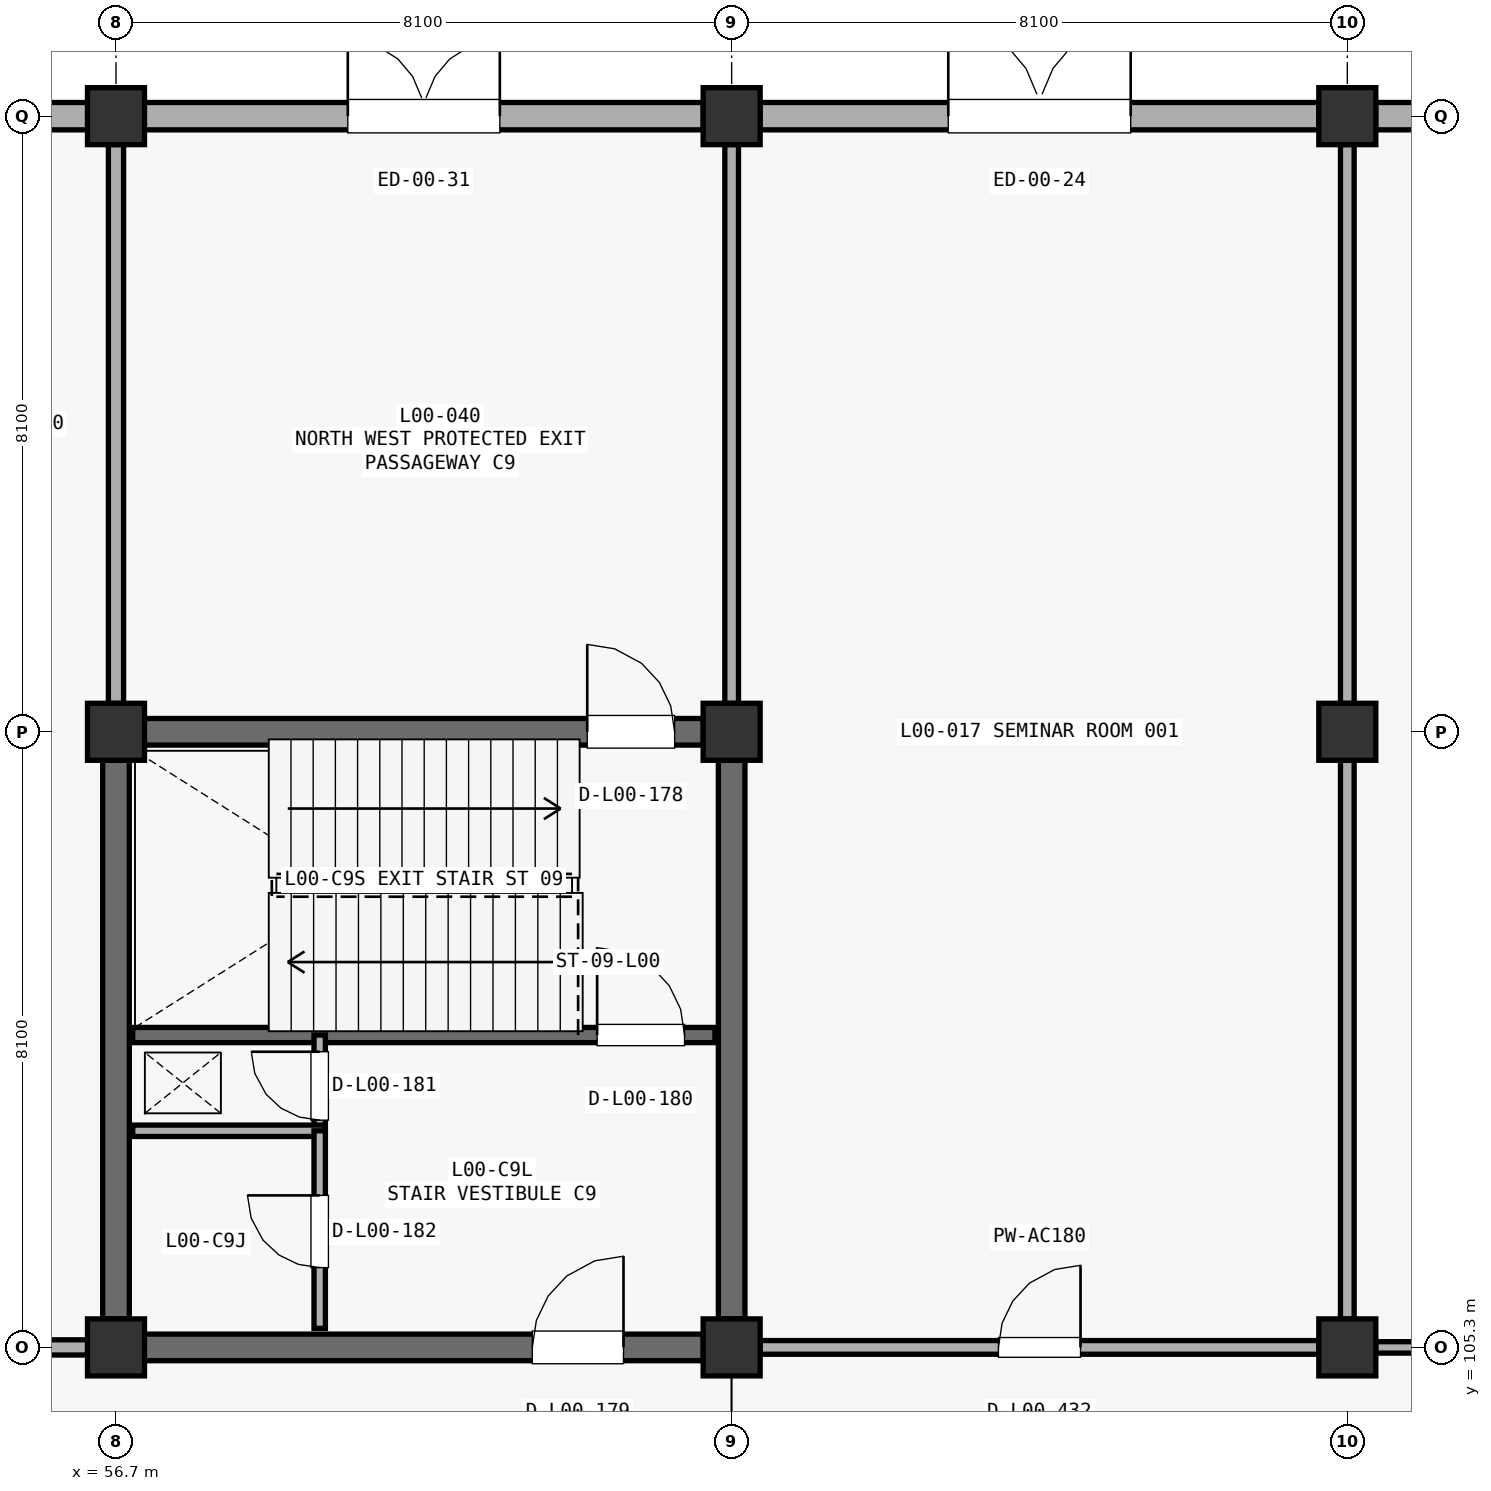
"""IFC4 building model, lengths in metres.
Left out: names, types, materials, properties, quantities, classifications, styles, units other than length and angle.
Written with IfcOpenShell. Run it as: python <this file> out.ifc"""

import sys

from ifc_helpers import new_model, si_unit, direction, frame, frame_2d, origin, origin_2d, place, context, subcontext, project, spatial, rectangle, extrude, element, fill, save


model = new_model("IFC4")
c1 = context("Model", 3, precision=1e-05, world=origin(), true_north=direction((0.0, 1.0)))
c2 = subcontext(c1, "Body", "Model", "MODEL_VIEW")
j1 = project(units=[si_unit("LENGTHUNIT", "METRE"), si_unit("PLANEANGLEUNIT", "RADIAN")], contexts=[c1])
p1 = place(None, origin())
s1 = spatial("IfcSite", under=j1, at=p1, CompositionType="ELEMENT")
p2 = place(p1, origin())
s2 = spatial("IfcBuilding", under=s1, at=p2, CompositionType="ELEMENT")
p3 = place(p2, origin())
s3 = spatial("IfcBuildingStorey", under=s2, at=p3, CompositionType="ELEMENT", Elevation=0.0)
for number, where, z_axis, x_axis in (
    (1, (56.7, 105.3, 0.0), (0.0, 0.0, 1.0), (1.0, 0.0, 0.0)),
    (2, (56.7, 113.4, 0.0), (0.0, 0.0, 1.0), (1.0, 0.0, 0.0)),
    (3, (56.7, 121.5, 0.0), (0.0, 0.0, 1.0), (1.0, 0.0, 0.0)),
    (4, (64.8, 105.3, 0.0), (0.0, 0.0, 1.0), (1.0, 0.0, 0.0)),
    (5, (64.8, 113.4, 0.0), (0.0, 0.0, 1.0), (1.0, 0.0, 0.0)),
    (6, (64.8, 121.5, 0.0), (0.0, 0.0, 1.0), (1.0, 0.0, 0.0)),
    (7, (72.9, 105.3, 0.0), (0.0, 0.0, 1.0), (1.0, 0.0, 0.0)),
    (8, (72.9, 113.4, 0.0), (0.0, 0.0, 1.0), (1.0, 0.0, 0.0)),
    (9, (72.9, 121.5, 0.0), (0.0, 0.0, 1.0), (1.0, 0.0, 0.0)),
):
    element("IfcColumn", number, at=place(p3, frame(where, z_axis=z_axis, x_axis=x_axis)), inside=s3, PredefinedType="COLUMN", context=c2, shape_type="SweptSolid", body=[
        extrude(rectangle(XDim=0.75, YDim=0.75, at=origin_2d()), origin(), (0.0, 0.0, 1.0), 5.1),
    ])
p4 = place(p3, frame((48.973, 121.5, 0.0), z_axis=(0.0, 0.0, 1.0), x_axis=(1.0, 0.0, 0.0)))
e10 = element("IfcWall", 10, at=p4, inside=s3, PredefinedType="STANDARD", context=c2, shape_type="SweptSolid", body=[
    extrude(rectangle(XDim=7.354, YDim=0.36, at=frame_2d((3.677, 0.0))), origin(), (0.0, 0.0, 1.0), 4.407),
])
p5 = place(p4, frame((2.477, 0.0, 0.0)))
e11 = element("IfcOpeningElement", 11, at=p5, cuts=e10, PredefinedType="OPENING", context=c2, shape_type="SweptSolid", body=[
    extrude(rectangle(XDim=2.4, YDim=2.4, at=frame_2d((1.2, 1.2))), frame((0.0, 0.19, 0.0), z_axis=(0.0, -1.0, 0.0), x_axis=(1.0, 0.0, 0.0)), (0.0, 0.0, 1.0), 0.38),
])
p6 = place(p3, frame((57.073, 121.5, 0.0), z_axis=(0.0, 0.0, 1.0), x_axis=(1.0, 0.0, 0.0)))
e12 = element("IfcWall", 12, at=p6, inside=s3, PredefinedType="STANDARD", context=c2, shape_type="SweptSolid", body=[
    extrude(rectangle(XDim=7.354, YDim=0.36, at=frame_2d((3.677, 0.0))), origin(), (0.0, 0.0, 1.0), 3.972),
])
p7 = place(p6, frame((2.677, 0.0, 0.0)))
e13 = element("IfcOpeningElement", 13, at=p7, cuts=e12, PredefinedType="OPENING", context=c2, shape_type="SweptSolid", body=[
    extrude(rectangle(XDim=2.0, YDim=2.2, at=frame_2d((1.0, 1.1))), frame((0.0, 0.19, 0.0), z_axis=(0.0, -1.0, 0.0), x_axis=(1.0, 0.0, 0.0)), (0.0, 0.0, 1.0), 0.38),
])
p8 = place(p3, frame((65.173, 121.5, 0.0), z_axis=(0.0, 0.0, 1.0), x_axis=(1.0, 0.0, 0.0)))
e14 = element("IfcWall", 14, at=p8, inside=s3, PredefinedType="STANDARD", context=c2, shape_type="SweptSolid", body=[
    extrude(rectangle(XDim=7.354, YDim=0.36, at=frame_2d((3.677, 0.0))), origin(), (0.0, 0.0, 1.0), 3.872),
])
p9 = place(p8, frame((2.477, 0.0, 0.0)))
e15 = element("IfcOpeningElement", 15, at=p9, cuts=e14, PredefinedType="OPENING", context=c2, shape_type="SweptSolid", body=[
    extrude(rectangle(XDim=2.4, YDim=2.4, at=frame_2d((1.2, 1.2))), frame((0.0, 0.19, 0.0), z_axis=(0.0, -1.0, 0.0), x_axis=(1.0, 0.0, 0.0)), (0.0, 0.0, 1.0), 0.38),
])
p10 = place(p3, frame((73.273, 121.5, 0.0), z_axis=(0.0, 0.0, 1.0), x_axis=(1.0, 0.0, 0.0)))
e16 = element("IfcWall", 16, at=p10, inside=s3, PredefinedType="STANDARD", context=c2, shape_type="SweptSolid", body=[
    extrude(rectangle(XDim=7.354, YDim=0.36, at=frame_2d((3.677, 0.0))), origin(), (0.0, 0.0, 1.0), 4.407),
])
p11 = place(p10, frame((3.227, 0.0, 0.85)))
e17 = element("IfcOpeningElement", 17, at=p11, cuts=e16, PredefinedType="OPENING", context=c2, shape_type="SweptSolid", body=[
    extrude(rectangle(XDim=0.9, YDim=1.9, at=frame_2d((0.45, 0.95))), frame((0.0, 0.19, 0.0), z_axis=(0.0, -1.0, 0.0), x_axis=(1.0, 0.0, 0.0)), (0.0, 0.0, 1.0), 0.38),
])
p12 = place(p3, frame((57.073, 113.4, 0.0), z_axis=(0.0, 0.0, 1.0), x_axis=(1.0, 0.0, 0.0)))
e18 = element("IfcWall", 18, at=p12, inside=s3, PredefinedType="SHEAR", context=c2, shape_type="SweptSolid", body=[
    extrude(rectangle(XDim=7.354, YDim=0.35, at=frame_2d((3.677, 0.0))), origin(), (0.0, 0.0, 1.0), 4.822),
])
p13 = place(p12, frame((5.827, 0.0, 0.0)))
e19 = element("IfcOpeningElement", 19, at=p13, cuts=e18, PredefinedType="OPENING", context=c2, shape_type="SweptSolid", body=[
    extrude(rectangle(XDim=1.15, YDim=2.2, at=frame_2d((0.575, 1.1))), frame((0.0, 0.185, 0.0), z_axis=(0.0, -1.0, 0.0), x_axis=(1.0, 0.0, 0.0)), (0.0, 0.0, 1.0), 0.37),
])
for number, where, z_axis, x_axis in (
    (20, (56.7, 105.673, 0.0), (0.0, 0.0, 1.0), (0.0, 1.0, 0.0)),
    (21, (64.8, 105.673, 0.0), (0.0, 0.0, 1.0), (0.0, 1.0, 0.0)),
):
    element("IfcWall", number, at=place(p3, frame(where, z_axis=z_axis, x_axis=x_axis)), inside=s3, PredefinedType="SHEAR", context=c2, shape_type="SweptSolid", body=[
        extrude(rectangle(XDim=7.354, YDim=0.35, at=frame_2d((3.677, 0.0))), origin(), (0.0, 0.0, 1.0), 4.822),
    ])
p14 = place(p3, frame((57.073, 105.3, 0.0), z_axis=(0.0, 0.0, 1.0), x_axis=(1.0, 0.0, 0.0)))
e22 = element("IfcWall", 22, at=p14, inside=s3, PredefinedType="SHEAR", context=c2, shape_type="SweptSolid", body=[
    extrude(rectangle(XDim=7.354, YDim=0.35, at=frame_2d((3.677, 0.0))), origin(), (0.0, 0.0, 1.0), 4.822),
])
p15 = place(p14, frame((5.104, 0.0, 0.0)))
e23 = element("IfcOpeningElement", 23, at=p15, cuts=e22, PredefinedType="OPENING", context=c2, shape_type="SweptSolid", body=[
    extrude(rectangle(XDim=1.2, YDim=2.2, at=frame_2d((0.6, 1.1))), frame((0.0, 0.185, 0.0), z_axis=(0.0, -1.0, 0.0), x_axis=(1.0, 0.0, 0.0)), (0.0, 0.0, 1.0), 0.37),
])
p16 = place(p3, frame((56.92, 109.41, 0.0), z_axis=(0.0, 0.0, 1.0), x_axis=(1.0, 0.0, 0.0)))
e24 = element("IfcWall", 24, at=p16, inside=s3, PredefinedType="SHEAR", context=c2, shape_type="SweptSolid", body=[
    extrude(rectangle(XDim=7.66, YDim=0.2, at=frame_2d((3.83, 0.0))), origin(), (0.0, 0.0, 1.0), 4.822),
])
p17 = place(p16, frame((6.11, 0.0, 0.0)))
e25 = element("IfcOpeningElement", 25, at=p17, cuts=e24, PredefinedType="OPENING", context=c2, shape_type="SweptSolid", body=[
    extrude(rectangle(XDim=1.15, YDim=2.2, at=frame_2d((0.575, 1.1))), frame((0.0, 0.11, 0.0), z_axis=(0.0, -1.0, 0.0), x_axis=(1.0, 0.0, 0.0)), (0.0, 0.0, 1.0), 0.22),
])
p18 = place(p3, frame((59.38, 108.15, 0.0), z_axis=(0.0, 0.0, 1.0), x_axis=(0.0, 1.0, 0.0)))
e26 = element("IfcWall", 26, at=p18, inside=s3, PredefinedType="PARTITIONING", context=c2, shape_type="SweptSolid", body=[
    extrude(rectangle(XDim=1.26, YDim=0.15, at=frame_2d((0.63, 0.0))), origin(), (0.0, 0.0, 1.0), 4.822),
])
p19 = place(p18, frame((0.14, 0.0, 0.0)))
e27 = element("IfcOpeningElement", 27, at=p19, cuts=e26, PredefinedType="OPENING", context=c2, shape_type="SweptSolid", body=[
    extrude(rectangle(XDim=0.9, YDim=2.15, at=frame_2d((0.45, 1.075))), frame((0.0, 0.085, 0.0), z_axis=(0.0, -1.0, 0.0), x_axis=(1.0, 0.0, 0.0)), (0.0, 0.0, 1.0), 0.17),
])
p20 = place(p3, frame((56.92, 108.15, 0.0), z_axis=(0.0, 0.0, 1.0), x_axis=(1.0, 0.0, 0.0)))
e28 = element("IfcWall", 28, at=p20, inside=s3, PredefinedType="PARTITIONING", context=c2, shape_type="SweptSolid", body=[
    extrude(rectangle(XDim=2.53, YDim=0.15, at=frame_2d((1.265, 0.0))), origin(), (0.0, 0.0, 1.0), 4.822),
])
p21 = place(p3, frame((59.38, 105.55, 0.0), z_axis=(0.0, 0.0, 1.0), x_axis=(0.0, 1.0, 0.0)))
e29 = element("IfcWall", 29, at=p21, inside=s3, PredefinedType="PARTITIONING", context=c2, shape_type="SweptSolid", body=[
    extrude(rectangle(XDim=2.6, YDim=0.15, at=frame_2d((1.3, 0.0))), origin(), (0.0, 0.0, 1.0), 4.822),
])
p22 = place(p21, frame((0.8, 0.0, 0.0)))
e30 = element("IfcOpeningElement", 30, at=p22, cuts=e29, PredefinedType="OPENING", context=c2, shape_type="SweptSolid", body=[
    extrude(rectangle(XDim=0.95, YDim=2.15, at=frame_2d((0.475, 1.075))), frame((0.0, 0.085, 0.0), z_axis=(0.0, -1.0, 0.0), x_axis=(1.0, 0.0, 0.0)), (0.0, 0.0, 1.0), 0.17),
])
p23 = place(p3, frame((48.973, 105.3, 0.0), z_axis=(0.0, 0.0, 1.0), x_axis=(1.0, 0.0, 0.0)))
e31 = element("IfcWall", 31, at=p23, inside=s3, PredefinedType="PARTITIONING", context=c2, shape_type="SweptSolid", body=[
    extrude(rectangle(XDim=7.354, YDim=0.2, at=frame_2d((3.677, 0.0))), origin(), (0.0, 0.0, 1.0), 4.072),
])
p24 = place(p3, frame((56.7, 113.773, 0.0), z_axis=(0.0, 0.0, 1.0), x_axis=(0.0, 1.0, 0.0)))
e32 = element("IfcWall", 32, at=p24, inside=s3, PredefinedType="PARTITIONING", context=c2, shape_type="SweptSolid", body=[
    extrude(rectangle(XDim=7.354, YDim=0.2, at=frame_2d((3.677, 0.0))), origin(), (0.0, 0.0, 1.0), 3.872),
])
p25 = place(p3, frame((65.173, 105.3, 0.0), z_axis=(0.0, 0.0, 1.0), x_axis=(1.0, 0.0, 0.0)))
e33 = element("IfcWall", 33, at=p25, inside=s3, PredefinedType="PARTITIONING", context=c2, shape_type="SweptSolid", body=[
    extrude(rectangle(XDim=7.354, YDim=0.18, at=frame_2d((3.677, 0.0))), origin(), (0.0, 0.0, 1.0), 4.222),
])
p26 = place(p25, frame((3.137, 0.0, 0.0)))
e34 = element("IfcOpeningElement", 34, at=p26, cuts=e33, PredefinedType="OPENING", context=c2, shape_type="SweptSolid", body=[
    extrude(rectangle(XDim=1.08, YDim=2.15, at=frame_2d((0.54, 1.075))), frame((0.0, 0.1, 0.0), z_axis=(0.0, -1.0, 0.0), x_axis=(1.0, 0.0, 0.0)), (0.0, 0.0, 1.0), 0.2),
])
p27 = place(p3, frame((72.9, 105.673, 0.0), z_axis=(0.0, 0.0, 1.0), x_axis=(0.0, 1.0, 0.0)))
e35 = element("IfcWall", 35, at=p27, inside=s3, PredefinedType="PARTITIONING", context=c2, shape_type="SweptSolid", body=[
    extrude(rectangle(XDim=7.354, YDim=0.18, at=frame_2d((3.677, 0.0))), origin(), (0.0, 0.0, 1.0), 4.222),
])
p28 = place(p3, frame((72.9, 113.773, 0.0), z_axis=(0.0, 0.0, 1.0), x_axis=(0.0, 1.0, 0.0)))
e36 = element("IfcWall", 36, at=p28, inside=s3, PredefinedType="PARTITIONING", context=c2, shape_type="SweptSolid", body=[
    extrude(rectangle(XDim=7.354, YDim=0.18, at=frame_2d((3.677, 0.0))), origin(), (0.0, 0.0, 1.0), 3.972),
])
p29 = place(p3, frame((64.8, 113.773, 0.0), z_axis=(0.0, 0.0, 1.0), x_axis=(0.0, 1.0, 0.0)))
e37 = element("IfcWall", 37, at=p29, inside=s3, PredefinedType="PARTITIONING", context=c2, shape_type="SweptSolid", body=[
    extrude(rectangle(XDim=7.354, YDim=0.18, at=frame_2d((3.677, 0.0))), origin(), (0.0, 0.0, 1.0), 4.172),
])
p30 = place(p3, frame((73.273, 105.3, 0.0), z_axis=(0.0, 0.0, 1.0), x_axis=(1.0, 0.0, 0.0)))
e38 = element("IfcWall", 38, at=p30, inside=s3, PredefinedType="PARTITIONING", context=c2, shape_type="SweptSolid", body=[
    extrude(rectangle(XDim=7.354, YDim=0.15, at=frame_2d((3.677, 0.0))), origin(), (0.0, 0.0, 1.0), 3.972),
])
p31 = place(p30, frame((2.777, 0.0, 0.0)))
e39 = element("IfcOpeningElement", 39, at=p31, cuts=e38, PredefinedType="OPENING", context=c2, shape_type="SweptSolid", body=[
    extrude(rectangle(XDim=1.8, YDim=2.2, at=frame_2d((0.9, 1.1))), frame((0.0, 0.085, 0.0), z_axis=(0.0, -1.0, 0.0), x_axis=(1.0, 0.0, 0.0)), (0.0, 0.0, 1.0), 0.17),
])
p32 = place(p7, origin())
e40 = element("IfcDoor", 40, at=p32, inside=s3, OperationType="DOUBLE_SWING_RIGHT", PredefinedType="DOOR", context=c2, shape_type="SweptSolid", body=[
    extrude(rectangle(XDim=2.0, YDim=2.2, at=frame_2d((1.0, 1.1))), frame((0.0, 0.025, 0.0), z_axis=(0.0, -1.0, 0.0), x_axis=(1.0, 0.0, 0.0)), (0.0, 0.0, 1.0), 0.05),
])
fill(e13, e40)
p33 = place(p9, origin())
e41 = element("IfcDoor", 41, at=p33, inside=s3, OperationType="DOUBLE_SWING_LEFT", PredefinedType="DOOR", context=c2, shape_type="SweptSolid", body=[
    extrude(rectangle(XDim=2.4, YDim=2.4, at=frame_2d((1.2, 1.2))), frame((0.0, 0.025, 0.0), z_axis=(0.0, -1.0, 0.0), x_axis=(1.0, 0.0, 0.0)), (0.0, 0.0, 1.0), 0.05),
])
fill(e15, e41)
p34 = place(p13, origin())
e42 = element("IfcDoor", 42, at=p34, inside=s3, OperationType="SINGLE_SWING_LEFT", PredefinedType="DOOR", context=c2, shape_type="SweptSolid", body=[
    extrude(rectangle(XDim=1.15, YDim=2.2, at=frame_2d((0.575, 1.1))), frame((0.0, 0.025, 0.0), z_axis=(0.0, -1.0, 0.0), x_axis=(1.0, 0.0, 0.0)), (0.0, 0.0, 1.0), 0.05),
])
fill(e19, e42)
p35 = place(p15, origin())
e43 = element("IfcDoor", 43, at=p35, inside=s3, OperationType="SINGLE_SWING_RIGHT", PredefinedType="DOOR", context=c2, shape_type="SweptSolid", body=[
    extrude(rectangle(XDim=1.2, YDim=2.2, at=frame_2d((0.6, 1.1))), frame((0.0, 0.025, 0.0), z_axis=(0.0, -1.0, 0.0), x_axis=(1.0, 0.0, 0.0)), (0.0, 0.0, 1.0), 0.05),
])
fill(e23, e43)
p36 = place(p17, origin())
e44 = element("IfcDoor", 44, at=p36, inside=s3, OperationType="SINGLE_SWING_LEFT", PredefinedType="DOOR", context=c2, shape_type="SweptSolid", body=[
    extrude(rectangle(XDim=1.15, YDim=2.2, at=frame_2d((0.575, 1.1))), frame((0.0, 0.025, 0.0), z_axis=(0.0, -1.0, 0.0), x_axis=(1.0, 0.0, 0.0)), (0.0, 0.0, 1.0), 0.05),
])
fill(e25, e44)
p37 = place(p19, origin())
e45 = element("IfcDoor", 45, at=p37, inside=s3, OperationType="SINGLE_SWING_RIGHT", PredefinedType="DOOR", context=c2, shape_type="SweptSolid", body=[
    extrude(rectangle(XDim=0.9, YDim=2.15, at=frame_2d((0.45, 1.075))), frame((0.0, 0.025, 0.0), z_axis=(0.0, -1.0, 0.0), x_axis=(1.0, 0.0, 0.0)), (0.0, 0.0, 1.0), 0.05),
])
fill(e27, e45)
p38 = place(p22, origin())
e46 = element("IfcDoor", 46, at=p38, inside=s3, OperationType="SINGLE_SWING_RIGHT", PredefinedType="DOOR", context=c2, shape_type="SweptSolid", body=[
    extrude(rectangle(XDim=0.95, YDim=2.15, at=frame_2d((0.475, 1.075))), frame((0.0, 0.025, 0.0), z_axis=(0.0, -1.0, 0.0), x_axis=(1.0, 0.0, 0.0)), (0.0, 0.0, 1.0), 0.05),
])
fill(e30, e46)
p39 = place(p26, origin())
e47 = element("IfcDoor", 47, at=p39, inside=s3, OperationType="SINGLE_SWING_RIGHT", PredefinedType="DOOR", context=c2, shape_type="SweptSolid", body=[
    extrude(rectangle(XDim=1.08, YDim=2.15, at=frame_2d((0.54, 1.075))), frame((0.0, 0.025, 0.0), z_axis=(0.0, -1.0, 0.0), x_axis=(1.0, 0.0, 0.0)), (0.0, 0.0, 1.0), 0.05),
])
fill(e34, e47)
save(model, sys.argv[1])
